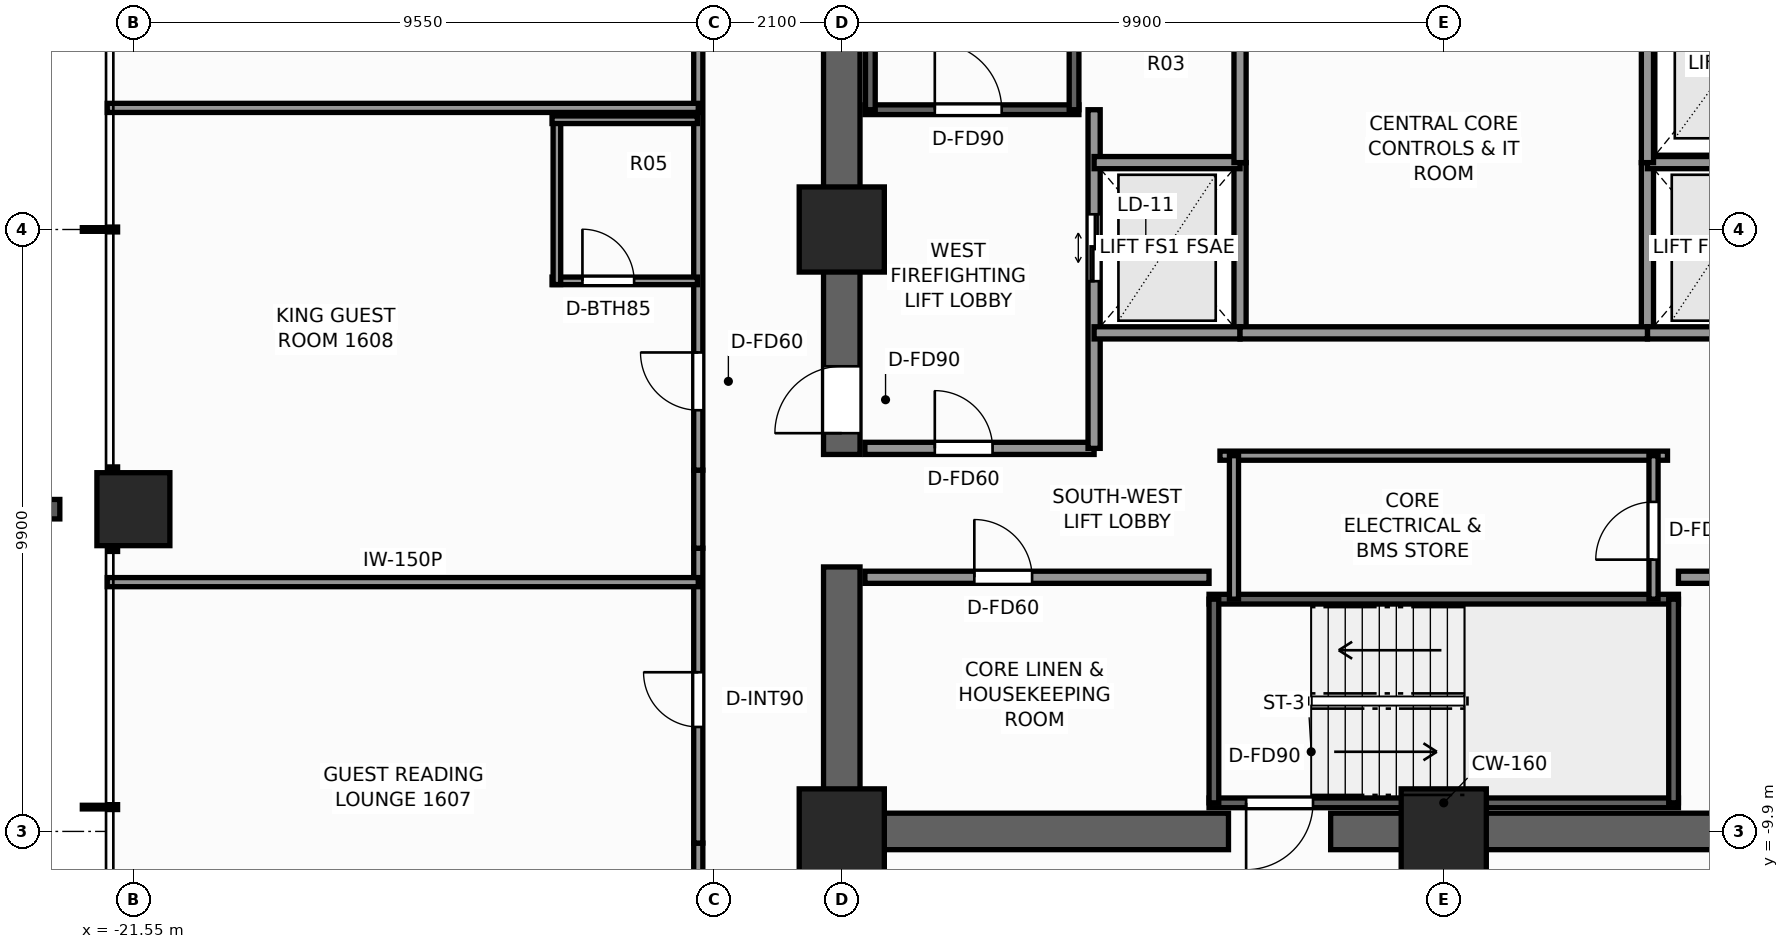
"""IFC4 building model, lengths in metres.
Left out: names, types, materials, properties, quantities, classifications, styles, units other than length and angle.
Written with IfcOpenShell. Run it as: python <this file> out.ifc"""

import sys

from ifc_helpers import new_model, si_unit, direction, frame, frame_2d, origin, origin_2d, place, context, subcontext, project, spatial, rectangle, extrude, element, fill, save


model = new_model("IFC4")
c1 = context("Model", 3, precision=1e-05, world=origin(), true_north=direction((0.0, 1.0)))
c2 = subcontext(c1, "Body", "Model", "MODEL_VIEW")
j1 = project(units=[si_unit("LENGTHUNIT", "METRE"), si_unit("PLANEANGLEUNIT", "RADIAN")], contexts=[c1])
p1 = place(None, origin())
s1 = spatial("IfcSite", under=j1, at=p1, CompositionType="ELEMENT")
p2 = place(p1, origin())
s2 = spatial("IfcBuilding", under=s1, at=p2, CompositionType="ELEMENT")
p3 = place(p2, frame((0.0, 0.0, 56.8)))
s3 = spatial("IfcBuildingStorey", under=s2, at=p3, CompositionType="ELEMENT", Elevation=56.8)
p4 = place(p3, frame((10.2, -9.9, 0.0), z_axis=(0.0, 0.0, 1.0), x_axis=(-1.0, 0.0, 0.0)))
e1 = element("IfcWall", 1, at=p4, inside=s3, PredefinedType="SHEAR", context=c2, shape_type="SweptSolid", body=[
    extrude(rectangle(XDim=12.06, YDim=0.6, at=frame_2d((6.03, 0.0))), origin(), (0.0, 0.0, 1.0), 3.3),
])
p5 = place(p3, frame((-3.54, -9.9, 0.0), z_axis=(0.0, 0.0, 1.0), x_axis=(-1.0, 0.0, 0.0)))
e2 = element("IfcWall", 2, at=p5, inside=s3, PredefinedType="SHEAR", context=c2, shape_type="SweptSolid", body=[
    extrude(rectangle(XDim=6.66, YDim=0.6, at=frame_2d((3.33, 0.0))), origin(), (0.0, 0.0, 1.0), 3.3),
])
p6 = place(p3, frame((-9.9, -9.6, 0.0), z_axis=(0.0, 0.0, 1.0), x_axis=(0.0, 1.0, 0.0)))
e3 = element("IfcWall", 3, at=p6, inside=s3, PredefinedType="SHEAR", context=c2, shape_type="SweptSolid", body=[
    extrude(rectangle(XDim=4.05, YDim=0.6, at=frame_2d((2.025, 0.0))), origin(), (0.0, 0.0, 1.0), 3.3),
])
p7 = place(p3, frame((-9.9, -3.7, 0.0), z_axis=(0.0, 0.0, 1.0), x_axis=(0.0, 1.0, 0.0)))
e4 = element("IfcWall", 4, at=p7, inside=s3, PredefinedType="SHEAR", context=c2, shape_type="SweptSolid", body=[
    extrude(rectangle(XDim=13.3, YDim=0.6, at=frame_2d((6.65, 0.0))), origin(), (0.0, 0.0, 1.0), 3.3),
])
p8 = place(p7, frame((0.35, 0.0, 0.0)))
e5 = element("IfcOpeningElement", 5, at=p8, cuts=e4, PredefinedType="OPENING", context=c2, shape_type="SweptSolid", body=[
    extrude(rectangle(XDim=1.1, YDim=2.2, at=frame_2d((0.55, 1.1))), frame((0.0, 0.31, 0.0), z_axis=(0.0, -1.0, 0.0), x_axis=(1.0, 0.0, 0.0)), (0.0, 0.0, 1.0), 0.62),
])
for number, where, z_axis, x_axis in (
    (6, (-9.9, -9.9, 0.0), (0.0, 0.0, 1.0), (1.0, 0.0, 0.0)),
    (7, (0.0, -9.9, 0.0), (0.0, 0.0, 1.0), (1.0, 0.0, 0.0)),
    (8, (-9.9, 0.0, 0.0), (0.0, 0.0, 1.0), (1.0, 0.0, 0.0)),
):
    element("IfcColumn", number, at=place(p3, frame(where, z_axis=z_axis, x_axis=x_axis)), inside=s3, PredefinedType="COLUMN", context=c2, shape_type="SweptSolid", body=[
        extrude(rectangle(XDim=1.4, YDim=1.4, at=origin_2d()), origin(), (0.0, 0.0, 1.0), 3.3),
    ])
p9 = place(p3, frame((-21.55, -4.6, 0.0), z_axis=(0.0, 0.0, 1.0), x_axis=(1.0, 0.0, 0.0)))
e9 = element("IfcColumn", 9, at=p9, inside=s3, PredefinedType="COLUMN", context=c2, shape_type="SweptSolid", body=[
    extrude(rectangle(XDim=1.2, YDim=1.2, at=origin_2d()), origin(), (0.0, 0.0, 1.0), 3.3),
])
p10 = place(p3, frame((-9.52, 1.97, 0.0), z_axis=(0.0, 0.0, 1.0), x_axis=(1.0, 0.0, 0.0)))
e10 = element("IfcWall", 10, at=p10, inside=s3, PredefinedType="SHEAR", context=c2, shape_type="SweptSolid", body=[
    extrude(rectangle(XDim=3.52, YDim=0.16, at=frame_2d((1.76, 0.0))), origin(), (0.0, 0.0, 1.0), 3.3),
])
p11 = place(p10, frame((1.15, 0.0, 0.0)))
e11 = element("IfcOpeningElement", 11, at=p11, cuts=e10, PredefinedType="OPENING", context=c2, shape_type="SweptSolid", body=[
    extrude(rectangle(XDim=1.1, YDim=2.2, at=frame_2d((0.55, 1.1))), frame((0.0, 0.09, 0.0), z_axis=(0.0, -1.0, 0.0), x_axis=(1.0, 0.0, 0.0)), (0.0, 0.0, 1.0), 0.18),
])
for number, where, z_axis, x_axis in (
    (12, (-9.43, 1.97, 0.0), (0.0, 0.0, 1.0), (0.0, 1.0, 0.0)),
    (13, (-6.08, 1.97, 0.0), (0.0, 0.0, 1.0), (0.0, 1.0, 0.0)),
):
    element("IfcWall", number, at=place(p3, frame(where, z_axis=z_axis, x_axis=x_axis)), inside=s3, PredefinedType="SHEAR", context=c2, shape_type="SweptSolid", body=[
        extrude(rectangle(XDim=7.56, YDim=0.16, at=frame_2d((3.78, 0.0))), origin(), (0.0, 0.0, 1.0), 3.3),
    ])
p12 = place(p3, frame((3.86, -9.43, 0.0), z_axis=(0.0, 0.0, 1.0), x_axis=(-1.0, 0.0, 0.0)))
e14 = element("IfcWall", 14, at=p12, inside=s3, PredefinedType="SHEAR", context=c2, shape_type="SweptSolid", body=[
    extrude(rectangle(XDim=7.72, YDim=0.16, at=frame_2d((3.86, 0.0))), origin(), (0.0, 0.0, 1.0), 3.3),
])
p13 = place(p12, frame((6.01, 0.0, 0.0)))
e15 = element("IfcOpeningElement", 15, at=p13, cuts=e14, PredefinedType="OPENING", context=c2, shape_type="SweptSolid", body=[
    extrude(rectangle(XDim=1.1, YDim=2.2, at=frame_2d((0.55, 1.1))), frame((0.0, 0.09, 0.0), z_axis=(0.0, -1.0, 0.0), x_axis=(1.0, 0.0, 0.0)), (0.0, 0.0, 1.0), 0.18),
])
p14 = place(p3, frame((-3.86, -6.08, 0.0), z_axis=(0.0, 0.0, 1.0), x_axis=(1.0, 0.0, 0.0)))
e16 = element("IfcWall", 16, at=p14, inside=s3, PredefinedType="SHEAR", context=c2, shape_type="SweptSolid", body=[
    extrude(rectangle(XDim=7.72, YDim=0.16, at=frame_2d((3.86, 0.0))), origin(), (0.0, 0.0, 1.0), 3.3),
])
for number, where, z_axis, x_axis in (
    (17, (-3.78, -9.43, 0.0), (0.0, 0.0, 1.0), (0.0, 1.0, 0.0)),
    (18, (3.78, -9.43, 0.0), (0.0, 0.0, 1.0), (0.0, 1.0, 0.0)),
):
    element("IfcWall", number, at=place(p3, frame(where, z_axis=z_axis, x_axis=x_axis)), inside=s3, PredefinedType="SHEAR", context=c2, shape_type="SweptSolid", body=[
        extrude(rectangle(XDim=3.35, YDim=0.16, at=frame_2d((1.675, 0.0))), origin(), (0.0, 0.0, 1.0), 3.3),
    ])
p15 = place(p3, frame((-9.52, -3.6, 0.0), z_axis=(0.0, 0.0, 1.0), x_axis=(1.0, 0.0, 0.0)))
e19 = element("IfcWall", 19, at=p15, inside=s3, PredefinedType="SOLIDWALL", context=c2, shape_type="SweptSolid", body=[
    extrude(rectangle(XDim=3.77, YDim=0.2, at=frame_2d((1.885, 0.0))), origin(), (0.0, 0.0, 1.0), 3.06),
])
p16 = place(p15, frame((1.15, 0.0, 0.0)))
e20 = element("IfcOpeningElement", 20, at=p16, cuts=e19, PredefinedType="OPENING", context=c2, shape_type="SweptSolid", body=[
    extrude(rectangle(XDim=0.95, YDim=2.06, at=frame_2d((0.475, 1.03))), frame((0.0, 0.11, 0.0), z_axis=(0.0, -1.0, 0.0), x_axis=(1.0, 0.0, 0.0)), (0.0, 0.0, 1.0), 0.22),
])
p17 = place(p3, frame((-5.75, -3.6, 0.0), z_axis=(0.0, 0.0, 1.0), x_axis=(0.0, 1.0, 0.0)))
e21 = element("IfcWall", 21, at=p17, inside=s3, PredefinedType="SOLIDWALL", context=c2, shape_type="SweptSolid", body=[
    extrude(rectangle(XDim=5.57, YDim=0.2, at=frame_2d((2.785, 0.0))), origin(), (0.0, 0.0, 1.0), 3.06),
])
p18 = place(p17, frame((2.75, 0.0, 0.0)))
e22 = element("IfcOpeningElement", 22, at=p18, cuts=e21, PredefinedType="OPENING", context=c2, shape_type="SweptSolid", body=[
    extrude(rectangle(XDim=1.1, YDim=2.2, at=frame_2d((0.55, 1.1))), frame((0.0, 0.11, 0.0), z_axis=(0.0, -1.0, 0.0), x_axis=(1.0, 0.0, 0.0)), (0.0, 0.0, 1.0), 0.22),
])
p19 = place(p3, frame((-3.35, -1.7, 0.0), z_axis=(0.0, 0.0, 1.0), x_axis=(0.0, 1.0, 0.0)))
e23 = element("IfcWall", 23, at=p19, inside=s3, PredefinedType="SOLIDWALL", context=c2, shape_type="SweptSolid", body=[
    extrude(rectangle(XDim=2.8, YDim=0.2, at=frame_2d((1.4, 0.0))), origin(), (0.0, 0.0, 1.0), 3.06),
])
for number, where, z_axis, x_axis in (
    (24, (-5.75, -1.7, 0.0), (0.0, 0.0, 1.0), (1.0, 0.0, 0.0)),
    (25, (-5.75, 1.1, 0.0), (0.0, 0.0, 1.0), (1.0, 0.0, 0.0)),
):
    element("IfcWall", number, at=place(p3, frame(where, z_axis=z_axis, x_axis=x_axis)), inside=s3, PredefinedType="SOLIDWALL", context=c2, shape_type="SweptSolid", body=[
        extrude(rectangle(XDim=2.4, YDim=0.2, at=frame_2d((1.2, 0.0))), origin(), (0.0, 0.0, 1.0), 3.06),
    ])
p20 = place(p3, frame((3.35, -1.7, 0.0), z_axis=(0.0, 0.0, 1.0), x_axis=(0.0, 1.0, 0.0)))
e26 = element("IfcWall", 26, at=p20, inside=s3, PredefinedType="SOLIDWALL", context=c2, shape_type="SweptSolid", body=[
    extrude(rectangle(XDim=2.8, YDim=0.2, at=frame_2d((1.4, 0.0))), origin(), (0.0, 0.0, 1.0), 3.06),
])
for number, where, z_axis, x_axis in (
    (27, (3.35, -1.7, 0.0), (0.0, 0.0, 1.0), (1.0, 0.0, 0.0)),
    (28, (3.35, 1.1, 0.0), (0.0, 0.0, 1.0), (1.0, 0.0, 0.0)),
):
    element("IfcWall", number, at=place(p3, frame(where, z_axis=z_axis, x_axis=x_axis)), inside=s3, PredefinedType="SOLIDWALL", context=c2, shape_type="SweptSolid", body=[
        extrude(rectangle(XDim=2.4, YDim=0.2, at=frame_2d((1.2, 0.0))), origin(), (0.0, 0.0, 1.0), 3.06),
    ])
p21 = place(p3, frame((-9.52, -5.72, 0.0), z_axis=(0.0, 0.0, 1.0), x_axis=(1.0, 0.0, 0.0)))
e29 = element("IfcWall", 29, at=p21, inside=s3, PredefinedType="SOLIDWALL", context=c2, shape_type="SweptSolid", body=[
    extrude(rectangle(XDim=5.66, YDim=0.2, at=frame_2d((2.83, 0.0))), origin(), (0.0, 0.0, 1.0), 3.06),
])
p22 = place(p21, frame((1.8, 0.0, 0.0)))
e30 = element("IfcOpeningElement", 30, at=p22, cuts=e29, PredefinedType="OPENING", context=c2, shape_type="SweptSolid", body=[
    extrude(rectangle(XDim=0.95, YDim=2.06, at=frame_2d((0.475, 1.03))), frame((0.0, 0.11, 0.0), z_axis=(0.0, -1.0, 0.0), x_axis=(1.0, 0.0, 0.0)), (0.0, 0.0, 1.0), 0.22),
])
p23 = place(p3, frame((3.86, -5.72, 0.0), z_axis=(0.0, 0.0, 1.0), x_axis=(1.0, 0.0, 0.0)))
e31 = element("IfcWall", 31, at=p23, inside=s3, PredefinedType="SOLIDWALL", context=c2, shape_type="SweptSolid", body=[
    extrude(rectangle(XDim=5.66, YDim=0.2, at=frame_2d((2.83, 0.0))), origin(), (0.0, 0.0, 1.0), 3.06),
])
p24 = place(p23, frame((1.8, 0.0, 0.0)))
e32 = element("IfcOpeningElement", 32, at=p24, cuts=e31, PredefinedType="OPENING", context=c2, shape_type="SweptSolid", body=[
    extrude(rectangle(XDim=0.95, YDim=2.06, at=frame_2d((0.475, 1.03))), frame((0.0, 0.11, 0.0), z_axis=(0.0, -1.0, 0.0), x_axis=(1.0, 0.0, 0.0)), (0.0, 0.0, 1.0), 0.22),
])
p25 = place(p3, frame((-3.35, -1.7, 0.0), z_axis=(0.0, 0.0, 1.0), x_axis=(1.0, 0.0, 0.0)))
e33 = element("IfcWall", 33, at=p25, inside=s3, PredefinedType="SOLIDWALL", context=c2, shape_type="SweptSolid", body=[
    extrude(rectangle(XDim=6.7, YDim=0.2, at=frame_2d((3.35, 0.0))), origin(), (0.0, 0.0, 1.0), 3.06),
])
for number, where, z_axis, x_axis in (
    (34, (-3.35, 1.1, 0.0), (0.0, 0.0, 1.0), (0.0, 1.0, 0.0)),
    (35, (3.35, 1.1, 0.0), (0.0, 0.0, 1.0), (0.0, 1.0, 0.0)),
):
    element("IfcWall", number, at=place(p3, frame(where, z_axis=z_axis, x_axis=x_axis)), inside=s3, PredefinedType="SOLIDWALL", context=c2, shape_type="SweptSolid", body=[
        extrude(rectangle(XDim=3.2, YDim=0.2, at=frame_2d((1.6, 0.0))), origin(), (0.0, 0.0, 1.0), 3.06),
    ])
p26 = place(p3, frame((-3.68, -3.72, 0.0), z_axis=(0.0, 0.0, 1.0), x_axis=(1.0, 0.0, 0.0)))
e36 = element("IfcWall", 36, at=p26, inside=s3, PredefinedType="PARTITIONING", context=c2, shape_type="SweptSolid", body=[
    extrude(rectangle(XDim=7.36, YDim=0.15, at=frame_2d((3.68, 0.0))), origin(), (0.0, 0.0, 1.0), 3.06),
])
p27 = place(p3, frame((3.45, -6.08, 0.0), z_axis=(0.0, 0.0, 1.0), x_axis=(0.0, 1.0, 0.0)))
e37 = element("IfcWall", 37, at=p27, inside=s3, PredefinedType="PARTITIONING", context=c2, shape_type="SweptSolid", body=[
    extrude(rectangle(XDim=2.36, YDim=0.15, at=frame_2d((1.18, 0.0))), origin(), (0.0, 0.0, 1.0), 3.06),
])
p28 = place(p27, frame((0.65, 0.0, 0.0)))
e38 = element("IfcOpeningElement", 38, at=p28, cuts=e37, PredefinedType="OPENING", context=c2, shape_type="SweptSolid", body=[
    extrude(rectangle(XDim=0.95, YDim=2.06, at=frame_2d((0.475, 1.03))), frame((0.0, 0.085, 0.0), z_axis=(0.0, -1.0, 0.0), x_axis=(1.0, 0.0, 0.0)), (0.0, 0.0, 1.0), 0.17),
])
p29 = place(p3, frame((-3.45, -6.08, 0.0), z_axis=(0.0, 0.0, 1.0), x_axis=(0.0, 1.0, 0.0)))
e39 = element("IfcWall", 39, at=p29, inside=s3, PredefinedType="PARTITIONING", context=c2, shape_type="SweptSolid", body=[
    extrude(rectangle(XDim=2.36, YDim=0.15, at=frame_2d((1.18, 0.0))), origin(), (0.0, 0.0, 1.0), 3.06),
])
p30 = place(p3, frame((-12.26, -11.531, 0.0), z_axis=(0.0, 0.0, 1.0), x_axis=(0.0, 1.0, 0.0)))
e40 = element("IfcWall", 40, at=p30, inside=s3, PredefinedType="PARTITIONING", context=c2, shape_type="SweptSolid", body=[
    extrude(rectangle(XDim=1.439, YDim=0.15, at=frame_2d((0.72, 0.0))), origin(), (0.0, 0.0, 1.0), 1.245),
])
p31 = place(p3, frame((-12.26, -10.092, 0.0), z_axis=(0.0, 0.0, 1.0), x_axis=(0.0, 1.0, 0.0)))
e41 = element("IfcWall", 41, at=p31, inside=s3, PredefinedType="PARTITIONING", context=c2, shape_type="SweptSolid", body=[
    extrude(rectangle(XDim=4.85, YDim=0.15, at=frame_2d((2.425, 0.0))), origin(), (0.0, 0.0, 1.0), 3.06),
])
p32 = place(p31, frame((1.91, 0.0, 0.0)))
e42 = element("IfcOpeningElement", 42, at=p32, cuts=e41, PredefinedType="OPENING", context=c2, shape_type="SweptSolid", body=[
    extrude(rectangle(XDim=0.9, YDim=2.06, at=frame_2d((0.45, 1.03))), frame((0.0, 0.085, 0.0), z_axis=(0.0, -1.0, 0.0), x_axis=(1.0, 0.0, 0.0)), (0.0, 0.0, 1.0), 0.17),
])
p33 = place(p3, frame((-12.26, -5.242, 0.0), z_axis=(0.0, 0.0, 1.0), x_axis=(0.0, 1.0, 0.0)))
e43 = element("IfcWall", 43, at=p33, inside=s3, PredefinedType="PARTITIONING", context=c2, shape_type="SweptSolid", body=[
    extrude(rectangle(XDim=1.284, YDim=0.15, at=frame_2d((0.642, 0.0))), origin(), (0.0, 0.0, 1.0), 1.245),
])
p34 = place(p3, frame((-12.26, -3.958, 0.0), z_axis=(0.0, 0.0, 1.0), x_axis=(0.0, 1.0, 0.0)))
e44 = element("IfcWall", 44, at=p34, inside=s3, PredefinedType="PARTITIONING", context=c2, shape_type="SweptSolid", body=[
    extrude(rectangle(XDim=7.916, YDim=0.15, at=frame_2d((3.958, 0.0))), origin(), (0.0, 0.0, 1.0), 2.349),
])
p35 = place(p34, frame((0.986, 0.0, 0.0)))
e45 = element("IfcOpeningElement", 45, at=p35, cuts=e44, PredefinedType="OPENING", context=c2, shape_type="SweptSolid", body=[
    extrude(rectangle(XDim=0.95, YDim=2.06, at=frame_2d((0.475, 1.03))), frame((0.0, 0.085, 0.0), z_axis=(0.0, -1.0, 0.0), x_axis=(1.0, 0.0, 0.0)), (0.0, 0.0, 1.0), 0.17),
])
for number, where, z_axis, x_axis in (
    (46, (-21.98, -5.8, 0.0), (0.0, 0.0, 1.0), (1.0, 0.0, 0.0)),
    (47, (-21.98, 2.0, 0.0), (0.0, 0.0, 1.0), (1.0, 0.0, 0.0)),
):
    element("IfcWall", number, at=place(p3, frame(where, z_axis=z_axis, x_axis=x_axis)), inside=s3, PredefinedType="PARTITIONING", context=c2, shape_type="SweptSolid", body=[
        extrude(rectangle(XDim=9.72, YDim=0.15, at=frame_2d((4.86, 0.0))), origin(), (0.0, 0.0, 1.0), 2.429),
    ])
p36 = place(p3, frame((-14.665, -0.845, 0.0), z_axis=(0.0, 0.0, 1.0), x_axis=(1.0, 0.0, 0.0)))
e48 = element("IfcWall", 48, at=p36, inside=s3, PredefinedType="PARTITIONING", context=c2, shape_type="SweptSolid", body=[
    extrude(rectangle(XDim=2.39, YDim=0.125, at=frame_2d((1.195, 0.0))), origin(), (0.0, 0.0, 1.0), 3.06),
])
p37 = place(p36, frame((0.5, 0.0, 0.0)))
e49 = element("IfcOpeningElement", 49, at=p37, cuts=e48, PredefinedType="OPENING", context=c2, shape_type="SweptSolid", body=[
    extrude(rectangle(XDim=0.85, YDim=2.03, at=frame_2d((0.425, 1.015))), frame((0.0, 0.073, 0.0), z_axis=(0.0, -1.0, 0.0), x_axis=(1.0, 0.0, 0.0)), (0.0, 0.0, 1.0), 0.145),
])
p38 = place(p3, frame((-14.585, -0.905, 0.0), z_axis=(0.0, 0.0, 1.0), x_axis=(0.0, 1.0, 0.0)))
e50 = element("IfcWall", 50, at=p38, inside=s3, PredefinedType="PARTITIONING", context=c2, shape_type="SweptSolid", body=[
    extrude(rectangle(XDim=2.77, YDim=0.125, at=frame_2d((1.385, 0.0))), origin(), (0.0, 0.0, 1.0), 2.585),
])
p39 = place(p3, frame((-14.665, 1.805, 0.0), z_axis=(0.0, 0.0, 1.0), x_axis=(1.0, 0.0, 0.0)))
e51 = element("IfcWall", 51, at=p39, inside=s3, PredefinedType="PARTITIONING", context=c2, shape_type="SweptSolid", body=[
    extrude(rectangle(XDim=2.39, YDim=0.125, at=frame_2d((1.195, 0.0))), origin(), (0.0, 0.0, 1.0), 3.06),
])
p40 = place(p11, origin())
e52 = element("IfcDoor", 52, at=p40, inside=s3, OperationType="SINGLE_SWING_LEFT", PredefinedType="DOOR", context=c2, shape_type="SweptSolid", body=[
    extrude(rectangle(XDim=1.1, YDim=2.2, at=frame_2d((0.55, 1.1))), frame((0.0, 0.025, 0.0), z_axis=(0.0, -1.0, 0.0), x_axis=(1.0, 0.0, 0.0)), (0.0, 0.0, 1.0), 0.05),
])
fill(e11, e52)
p41 = place(p13, origin())
e53 = element("IfcDoor", 53, at=p41, inside=s3, OperationType="SINGLE_SWING_RIGHT", PredefinedType="DOOR", context=c2, shape_type="SweptSolid", body=[
    extrude(rectangle(XDim=1.1, YDim=2.2, at=frame_2d((0.55, 1.1))), frame((0.0, 0.025, 0.0), z_axis=(0.0, -1.0, 0.0), x_axis=(1.0, 0.0, 0.0)), (0.0, 0.0, 1.0), 0.05),
])
fill(e15, e53)
p42 = place(p8, origin())
e54 = element("IfcDoor", 54, at=p42, inside=s3, OperationType="SINGLE_SWING_LEFT", PredefinedType="DOOR", context=c2, shape_type="SweptSolid", body=[
    extrude(rectangle(XDim=1.1, YDim=2.2, at=frame_2d((0.55, 1.1))), frame((0.0, 0.025, 0.0), z_axis=(0.0, -1.0, 0.0), x_axis=(1.0, 0.0, 0.0)), (0.0, 0.0, 1.0), 0.05),
])
fill(e5, e54)
p43 = place(p18, origin())
e55 = element("IfcDoor", 55, at=p43, inside=s3, OperationType="DOUBLE_DOOR_SLIDING", PredefinedType="DOOR", context=c2, shape_type="SweptSolid", body=[
    extrude(rectangle(XDim=1.1, YDim=2.2, at=frame_2d((0.55, 1.1))), frame((0.0, 0.025, 0.0), z_axis=(0.0, -1.0, 0.0), x_axis=(1.0, 0.0, 0.0)), (0.0, 0.0, 1.0), 0.05),
])
fill(e22, e55)
p44 = place(p22, origin())
e56 = element("IfcDoor", 56, at=p44, inside=s3, OperationType="SINGLE_SWING_LEFT", PredefinedType="DOOR", context=c2, shape_type="SweptSolid", body=[
    extrude(rectangle(XDim=0.95, YDim=2.06, at=frame_2d((0.475, 1.03))), frame((0.0, 0.025, 0.0), z_axis=(0.0, -1.0, 0.0), x_axis=(1.0, 0.0, 0.0)), (0.0, 0.0, 1.0), 0.05),
])
fill(e30, e56)
p45 = place(p16, origin())
e57 = element("IfcDoor", 57, at=p45, inside=s3, OperationType="SINGLE_SWING_LEFT", PredefinedType="DOOR", context=c2, shape_type="SweptSolid", body=[
    extrude(rectangle(XDim=0.95, YDim=2.06, at=frame_2d((0.475, 1.03))), frame((0.0, 0.025, 0.0), z_axis=(0.0, -1.0, 0.0), x_axis=(1.0, 0.0, 0.0)), (0.0, 0.0, 1.0), 0.05),
])
fill(e20, e57)
p46 = place(p28, origin())
e58 = element("IfcDoor", 58, at=p46, inside=s3, OperationType="SINGLE_SWING_LEFT", PredefinedType="DOOR", context=c2, shape_type="SweptSolid", body=[
    extrude(rectangle(XDim=0.95, YDim=2.06, at=frame_2d((0.475, 1.03))), frame((0.0, 0.025, 0.0), z_axis=(0.0, -1.0, 0.0), x_axis=(1.0, 0.0, 0.0)), (0.0, 0.0, 1.0), 0.05),
])
fill(e38, e58)
p47 = place(p32, origin())
e59 = element("IfcDoor", 59, at=p47, inside=s3, OperationType="SINGLE_SWING_RIGHT", PredefinedType="DOOR", context=c2, shape_type="SweptSolid", body=[
    extrude(rectangle(XDim=0.9, YDim=2.06, at=frame_2d((0.45, 1.03))), frame((0.0, 0.025, 0.0), z_axis=(0.0, -1.0, 0.0), x_axis=(1.0, 0.0, 0.0)), (0.0, 0.0, 1.0), 0.05),
])
fill(e42, e59)
p48 = place(p37, origin())
e60 = element("IfcDoor", 60, at=p48, inside=s3, OperationType="SINGLE_SWING_LEFT", PredefinedType="DOOR", context=c2, shape_type="SweptSolid", body=[
    extrude(rectangle(XDim=0.85, YDim=2.03, at=frame_2d((0.425, 1.015))), frame((0.0, 0.025, 0.0), z_axis=(0.0, -1.0, 0.0), x_axis=(1.0, 0.0, 0.0)), (0.0, 0.0, 1.0), 0.05),
])
fill(e49, e60)
p49 = place(p35, origin())
e61 = element("IfcDoor", 61, at=p49, inside=s3, OperationType="SINGLE_SWING_RIGHT", PredefinedType="DOOR", context=c2, shape_type="SweptSolid", body=[
    extrude(rectangle(XDim=0.95, YDim=2.06, at=frame_2d((0.475, 1.03))), frame((0.0, 0.025, 0.0), z_axis=(0.0, -1.0, 0.0), x_axis=(1.0, 0.0, 0.0)), (0.0, 0.0, 1.0), 0.05),
])
fill(e45, e61)
save(model, sys.argv[1])
